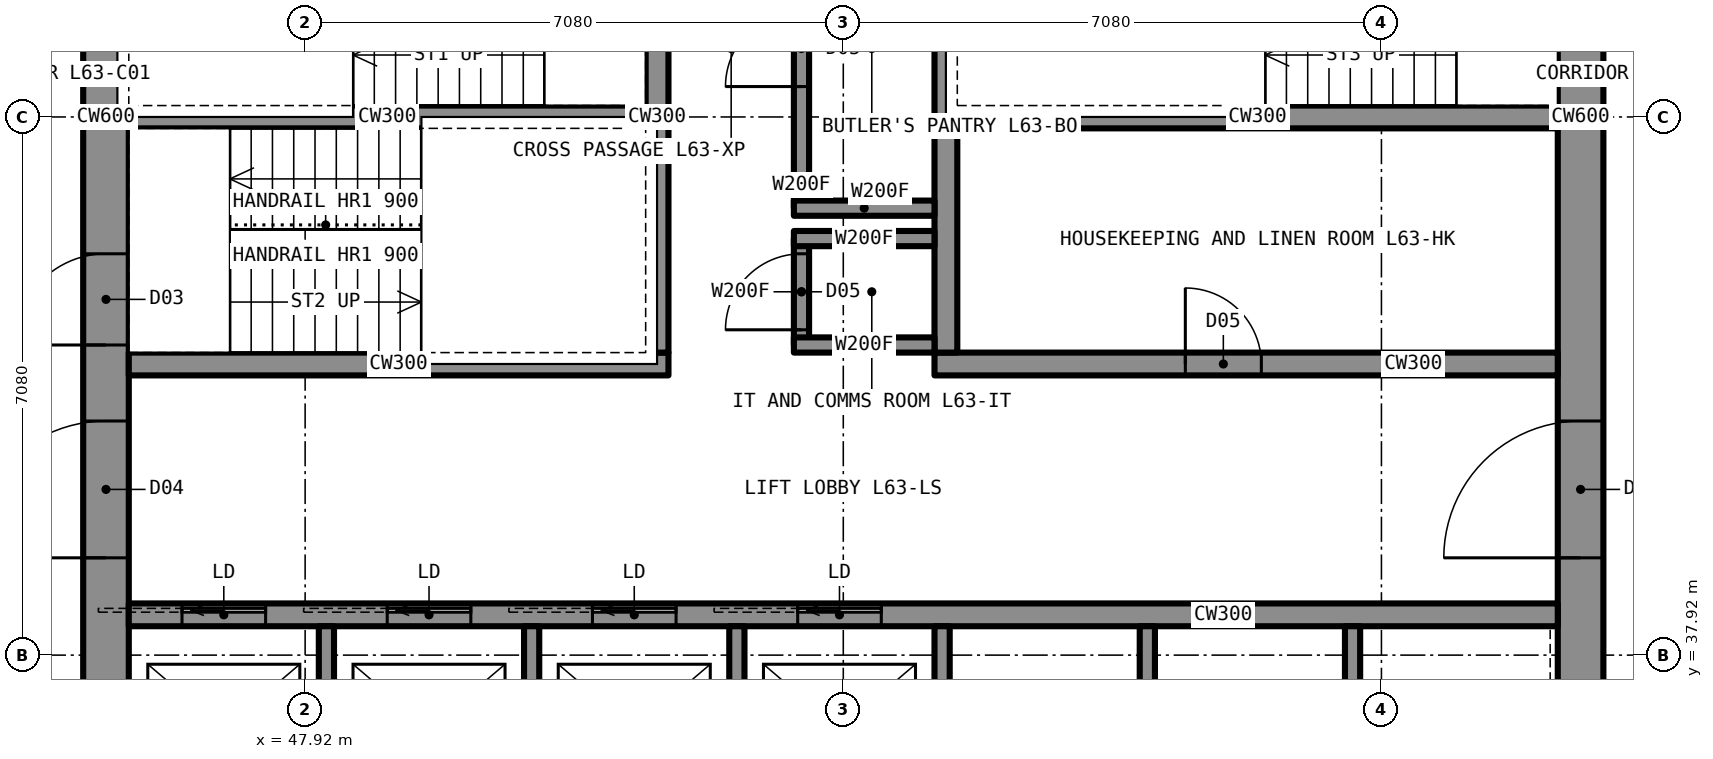
"""IFC4 building model, lengths in metres.
Left out: names, types, materials, properties, quantities, classifications, styles, units other than length and angle.
Written with IfcOpenShell. Run it as: python <this file> out.ifc"""

import sys

from ifc_helpers import new_model, si_unit, direction, frame, frame_2d, origin, place, context, subcontext, project, spatial, rectangle, extrude, element, fill, save


model = new_model("IFC4")
c1 = context("Model", 3, precision=1e-05, world=origin(), true_north=direction((0.0, 1.0)))
c2 = subcontext(c1, "Body", "Model", "MODEL_VIEW")
j1 = project(units=[si_unit("LENGTHUNIT", "METRE"), si_unit("PLANEANGLEUNIT", "RADIAN")], contexts=[c1])
p1 = place(None, origin())
s1 = spatial("IfcSite", under=j1, at=p1, CompositionType="ELEMENT")
p2 = place(p1, origin())
s2 = spatial("IfcBuilding", under=s1, at=p2, CompositionType="ELEMENT")
p3 = place(p2, frame((0.0, 0.0, 226.7)))
s3 = spatial("IfcBuildingStorey", under=s2, at=p3, CompositionType="ELEMENT", Elevation=226.7)
p4 = place(p3, frame((64.7, 35.6, 0.0), z_axis=(0.0, 0.0, 1.0), x_axis=(0.0, 1.0, 0.0)))
e1 = element("IfcWall", 1, at=p4, inside=s3, PredefinedType="SHEAR", context=c2, shape_type="SweptSolid", body=[
    extrude(rectangle(XDim=18.8, YDim=0.6, at=frame_2d((9.4, 0.0))), origin(), (0.0, 0.0, 1.0), 3.5),
])
p5 = place(p4, frame((13.4, 0.0, 0.0)))
e2 = element("IfcOpeningElement", 2, at=p5, cuts=e1, PredefinedType="OPENING", context=c2, shape_type="SweptSolid", body=[
    extrude(rectangle(XDim=1.8, YDim=2.2, at=frame_2d((0.9, 1.1))), frame((0.0, 0.31, 0.0), z_axis=(0.0, -1.0, 0.0), x_axis=(1.0, 0.0, 0.0)), (0.0, 0.0, 1.0), 0.62),
])
p6 = place(p4, frame((3.6, 0.0, 0.0)))
e3 = element("IfcOpeningElement", 3, at=p6, cuts=e1, PredefinedType="OPENING", context=c2, shape_type="SweptSolid", body=[
    extrude(rectangle(XDim=1.8, YDim=2.2, at=frame_2d((0.9, 1.1))), frame((0.0, 0.31, 0.0), z_axis=(0.0, -1.0, 0.0), x_axis=(1.0, 0.0, 0.0)), (0.0, 0.0, 1.0), 0.62),
])
p7 = place(p3, frame((45.3, 35.6, 0.0), z_axis=(0.0, 0.0, 1.0), x_axis=(0.0, 1.0, 0.0)))
e4 = element("IfcWall", 4, at=p7, inside=s3, PredefinedType="SHEAR", context=c2, shape_type="SweptSolid", body=[
    extrude(rectangle(XDim=18.8, YDim=0.6, at=frame_2d((9.4, 0.0))), origin(), (0.0, 0.0, 1.0), 3.5),
])
p8 = place(p7, frame((13.4, 0.0, 0.0)))
e5 = element("IfcOpeningElement", 5, at=p8, cuts=e4, PredefinedType="OPENING", context=c2, shape_type="SweptSolid", body=[
    extrude(rectangle(XDim=1.8, YDim=2.2, at=frame_2d((0.9, 1.1))), frame((0.0, 0.31, 0.0), z_axis=(0.0, -1.0, 0.0), x_axis=(1.0, 0.0, 0.0)), (0.0, 0.0, 1.0), 0.62),
])
p9 = place(p7, frame((3.6, 0.0, 0.0)))
e6 = element("IfcOpeningElement", 6, at=p9, cuts=e4, PredefinedType="OPENING", context=c2, shape_type="SweptSolid", body=[
    extrude(rectangle(XDim=1.8, YDim=2.2, at=frame_2d((0.9, 1.1))), frame((0.0, 0.31, 0.0), z_axis=(0.0, -1.0, 0.0), x_axis=(1.0, 0.0, 0.0)), (0.0, 0.0, 1.0), 0.62),
])
p10 = place(p7, frame((6.4, 0.0, 0.0)))
e7 = element("IfcOpeningElement", 7, at=p10, cuts=e4, PredefinedType="OPENING", context=c2, shape_type="SweptSolid", body=[
    extrude(rectangle(XDim=1.2, YDim=2.2, at=frame_2d((0.6, 1.1))), frame((0.0, 0.31, 0.0), z_axis=(0.0, -1.0, 0.0), x_axis=(1.0, 0.0, 0.0)), (0.0, 0.0, 1.0), 0.62),
])
p11 = place(p3, frame((45.6, 38.45, 0.0), z_axis=(0.0, 0.0, 1.0), x_axis=(1.0, 0.0, 0.0)))
e8 = element("IfcWall", 8, at=p11, inside=s3, PredefinedType="SHEAR", context=c2, shape_type="SweptSolid", body=[
    extrude(rectangle(XDim=18.8, YDim=0.3, at=frame_2d((9.4, 0.0))), origin(), (0.0, 0.0, 1.0), 3.5),
])
p12 = place(p11, frame((0.7, 0.0, 0.0)))
e9 = element("IfcOpeningElement", 9, at=p12, cuts=e8, PredefinedType="OPENING", context=c2, shape_type="SweptSolid", body=[
    extrude(rectangle(XDim=1.1, YDim=2.2, at=frame_2d((0.55, 1.1))), frame((0.0, 0.16, 0.0), z_axis=(0.0, -1.0, 0.0), x_axis=(1.0, 0.0, 0.0)), (0.0, 0.0, 1.0), 0.32),
])
p13 = place(p11, frame((3.4, 0.0, 0.0)))
e10 = element("IfcOpeningElement", 10, at=p13, cuts=e8, PredefinedType="OPENING", context=c2, shape_type="SweptSolid", body=[
    extrude(rectangle(XDim=1.1, YDim=2.2, at=frame_2d((0.55, 1.1))), frame((0.0, 0.16, 0.0), z_axis=(0.0, -1.0, 0.0), x_axis=(1.0, 0.0, 0.0)), (0.0, 0.0, 1.0), 0.32),
])
p14 = place(p11, frame((6.1, 0.0, 0.0)))
e11 = element("IfcOpeningElement", 11, at=p14, cuts=e8, PredefinedType="OPENING", context=c2, shape_type="SweptSolid", body=[
    extrude(rectangle(XDim=1.1, YDim=2.2, at=frame_2d((0.55, 1.1))), frame((0.0, 0.16, 0.0), z_axis=(0.0, -1.0, 0.0), x_axis=(1.0, 0.0, 0.0)), (0.0, 0.0, 1.0), 0.32),
])
p15 = place(p11, frame((8.8, 0.0, 0.0)))
e12 = element("IfcOpeningElement", 12, at=p15, cuts=e8, PredefinedType="OPENING", context=c2, shape_type="SweptSolid", body=[
    extrude(rectangle(XDim=1.1, YDim=2.2, at=frame_2d((0.55, 1.1))), frame((0.0, 0.16, 0.0), z_axis=(0.0, -1.0, 0.0), x_axis=(1.0, 0.0, 0.0)), (0.0, 0.0, 1.0), 0.32),
])
p16 = place(p3, frame((45.6, 41.75, 0.0), z_axis=(0.0, 0.0, 1.0), x_axis=(1.0, 0.0, 0.0)))
e13 = element("IfcWall", 13, at=p16, inside=s3, PredefinedType="SHEAR", context=c2, shape_type="SweptSolid", body=[
    extrude(rectangle(XDim=7.1, YDim=0.3, at=frame_2d((3.55, 0.0))), origin(), (0.0, 0.0, 1.0), 3.5),
])
p17 = place(p3, frame((56.2, 41.75, 0.0), z_axis=(0.0, 0.0, 1.0), x_axis=(1.0, 0.0, 0.0)))
e14 = element("IfcWall", 14, at=p17, inside=s3, PredefinedType="SHEAR", context=c2, shape_type="SweptSolid", body=[
    extrude(rectangle(XDim=8.2, YDim=0.3, at=frame_2d((4.1, 0.0))), origin(), (0.0, 0.0, 1.0), 3.5),
])
p18 = place(p17, frame((3.3, 0.0, 0.0)))
e15 = element("IfcOpeningElement", 15, at=p18, cuts=e14, PredefinedType="OPENING", context=c2, shape_type="SweptSolid", body=[
    extrude(rectangle(XDim=1.0, YDim=2.1, at=frame_2d((0.5, 1.05))), frame((0.0, 0.16, 0.0), z_axis=(0.0, -1.0, 0.0), x_axis=(1.0, 0.0, 0.0)), (0.0, 0.0, 1.0), 0.32),
])
p19 = place(p3, frame((52.55, 41.9, 0.0), z_axis=(0.0, 0.0, 1.0), x_axis=(0.0, 1.0, 0.0)))
e16 = element("IfcWall", 16, at=p19, inside=s3, PredefinedType="SHEAR", context=c2, shape_type="SweptSolid", body=[
    extrude(rectangle(XDim=6.2, YDim=0.3, at=frame_2d((3.1, 0.0))), origin(), (0.0, 0.0, 1.0), 3.5),
])
p20 = place(p19, frame((4.125, 0.0, 0.0)))
e17 = element("IfcOpeningElement", 17, at=p20, cuts=e16, PredefinedType="OPENING", context=c2, shape_type="SweptSolid", body=[
    extrude(rectangle(XDim=1.2, YDim=2.2, at=frame_2d((0.6, 1.1))), frame((0.0, 0.16, 0.0), z_axis=(0.0, -1.0, 0.0), x_axis=(1.0, 0.0, 0.0)), (0.0, 0.0, 1.0), 0.32),
])
p21 = place(p3, frame((56.35, 41.9, 0.0), z_axis=(0.0, 0.0, 1.0), x_axis=(0.0, 1.0, 0.0)))
e18 = element("IfcWall", 18, at=p21, inside=s3, PredefinedType="SHEAR", context=c2, shape_type="SweptSolid", body=[
    extrude(rectangle(XDim=9.5, YDim=0.3, at=frame_2d((4.75, 0.0))), origin(), (0.0, 0.0, 1.0), 3.5),
])
p22 = place(p21, frame((7.1, 0.0, 0.0)))
e19 = element("IfcOpeningElement", 19, at=p22, cuts=e18, PredefinedType="OPENING", context=c2, shape_type="SweptSolid", body=[
    extrude(rectangle(XDim=1.8, YDim=2.2, at=frame_2d((0.9, 1.1))), frame((0.0, 0.16, 0.0), z_axis=(0.0, -1.0, 0.0), x_axis=(1.0, 0.0, 0.0)), (0.0, 0.0, 1.0), 0.32),
])
p23 = place(p3, frame((45.6, 45.0, 0.0), z_axis=(0.0, 0.0, 1.0), x_axis=(1.0, 0.0, 0.0)))
e20 = element("IfcWall", 20, at=p23, inside=s3, PredefinedType="SHEAR", context=c2, shape_type="SweptSolid", body=[
    extrude(rectangle(XDim=6.8, YDim=0.3, at=frame_2d((3.4, 0.0))), origin(), (0.0, 0.0, 1.0), 3.5),
])
p24 = place(p3, frame((56.5, 45.0, 0.0), z_axis=(0.0, 0.0, 1.0), x_axis=(1.0, 0.0, 0.0)))
e21 = element("IfcWall", 21, at=p24, inside=s3, PredefinedType="SHEAR", context=c2, shape_type="SweptSolid", body=[
    extrude(rectangle(XDim=7.9, YDim=0.3, at=frame_2d((3.95, 0.0))), origin(), (0.0, 0.0, 1.0), 3.5),
])
p25 = place(p3, frame((54.45, 42.0, 0.0), z_axis=(0.0, 0.0, 1.0), x_axis=(0.0, 1.0, 0.0)))
e22 = element("IfcWall", 22, at=p25, inside=s3, PredefinedType="PARTITIONING", context=c2, shape_type="SweptSolid", body=[
    extrude(rectangle(XDim=2.3, YDim=0.2, at=frame_2d((1.15, 0.0))), origin(), (0.0, 0.0, 1.0), 3.33),
])
p26 = place(p25, frame((0.65, 0.0, 0.0)))
e23 = element("IfcOpeningElement", 23, at=p26, cuts=e22, PredefinedType="OPENING", context=c2, shape_type="SweptSolid", body=[
    extrude(rectangle(XDim=1.0, YDim=2.1, at=frame_2d((0.5, 1.05))), frame((0.0, 0.11, 0.0), z_axis=(0.0, -1.0, 0.0), x_axis=(1.0, 0.0, 0.0)), (0.0, 0.0, 1.0), 0.22),
])
for number, where, z_axis, x_axis in (
    (24, (54.35, 42.0, 0.0), (0.0, 0.0, 1.0), (1.0, 0.0, 0.0)),
    (25, (54.35, 44.3, 0.0), (0.0, 0.0, 1.0), (1.0, 0.0, 0.0)),
):
    element("IfcWall", number, at=place(p3, frame(where, z_axis=z_axis, x_axis=x_axis)), inside=s3, PredefinedType="PARTITIONING", context=c2, shape_type="SweptSolid", body=[
        extrude(rectangle(XDim=1.85, YDim=0.2, at=frame_2d((0.925, 0.0))), origin(), (0.0, 0.0, 1.0), 3.33),
    ])
p27 = place(p3, frame((54.45, 44.7, 0.0), z_axis=(0.0, 0.0, 1.0), x_axis=(0.0, 1.0, 0.0)))
e26 = element("IfcWall", 26, at=p27, inside=s3, PredefinedType="PARTITIONING", context=c2, shape_type="SweptSolid", body=[
    extrude(rectangle(XDim=3.3, YDim=0.2, at=frame_2d((1.65, 0.0))), origin(), (0.0, 0.0, 1.0), 3.33),
])
p28 = place(p27, frame((1.15, 0.0, 0.0)))
e27 = element("IfcOpeningElement", 27, at=p28, cuts=e26, PredefinedType="OPENING", context=c2, shape_type="SweptSolid", body=[
    extrude(rectangle(XDim=1.0, YDim=2.1, at=frame_2d((0.5, 1.05))), frame((0.0, 0.11, 0.0), z_axis=(0.0, -1.0, 0.0), x_axis=(1.0, 0.0, 0.0)), (0.0, 0.0, 1.0), 0.22),
])
p29 = place(p3, frame((54.35, 44.7, 0.0), z_axis=(0.0, 0.0, 1.0), x_axis=(1.0, 0.0, 0.0)))
e28 = element("IfcWall", 28, at=p29, inside=s3, PredefinedType="PARTITIONING", context=c2, shape_type="SweptSolid", body=[
    extrude(rectangle(XDim=1.85, YDim=0.2, at=frame_2d((0.925, 0.0))), origin(), (0.0, 0.0, 1.0), 3.33),
])
for number, where, z_axis, x_axis in (
    (29, (48.2, 35.6, 0.0), (0.0, 0.0, 1.0), (0.0, 1.0, 0.0)),
    (30, (50.9, 35.6, 0.0), (0.0, 0.0, 1.0), (0.0, 1.0, 0.0)),
    (31, (53.6, 35.6, 0.0), (0.0, 0.0, 1.0), (0.0, 1.0, 0.0)),
    (32, (56.3, 35.6, 0.0), (0.0, 0.0, 1.0), (0.0, 1.0, 0.0)),
    (33, (59.0, 35.6, 0.0), (0.0, 0.0, 1.0), (0.0, 1.0, 0.0)),
    (34, (61.7, 35.6, 0.0), (0.0, 0.0, 1.0), (0.0, 1.0, 0.0)),
):
    element("IfcWall", number, at=place(p3, frame(where, z_axis=z_axis, x_axis=x_axis)), inside=s3, PredefinedType="PARTITIONING", context=c2, shape_type="SweptSolid", body=[
        extrude(rectangle(XDim=2.7, YDim=0.2, at=frame_2d((1.35, 0.0))), origin(), (0.0, 0.0, 1.0), 3.33),
    ])
p30 = place(p26, origin())
e35 = element("IfcDoor", 35, at=p30, inside=s3, OperationType="SINGLE_SWING_LEFT", PredefinedType="DOOR", context=c2, shape_type="SweptSolid", body=[
    extrude(rectangle(XDim=1.0, YDim=2.1, at=frame_2d((0.5, 1.05))), frame((0.0, 0.025, 0.0), z_axis=(0.0, -1.0, 0.0), x_axis=(1.0, 0.0, 0.0)), (0.0, 0.0, 1.0), 0.05),
])
fill(e23, e35)
p31 = place(p28, origin())
e36 = element("IfcDoor", 36, at=p31, inside=s3, OperationType="SINGLE_SWING_LEFT", PredefinedType="DOOR", context=c2, shape_type="SweptSolid", body=[
    extrude(rectangle(XDim=1.0, YDim=2.1, at=frame_2d((0.5, 1.05))), frame((0.0, 0.025, 0.0), z_axis=(0.0, -1.0, 0.0), x_axis=(1.0, 0.0, 0.0)), (0.0, 0.0, 1.0), 0.05),
])
fill(e27, e36)
p32 = place(p9, origin())
e37 = element("IfcDoor", 37, at=p32, inside=s3, OperationType="DOUBLE_DOOR_SINGLE_SWING", PredefinedType="DOOR", context=c2, shape_type="SweptSolid", body=[
    extrude(rectangle(XDim=1.8, YDim=2.2, at=frame_2d((0.9, 1.1))), frame((0.0, 0.025, 0.0), z_axis=(0.0, -1.0, 0.0), x_axis=(1.0, 0.0, 0.0)), (0.0, 0.0, 1.0), 0.05),
])
fill(e6, e37)
p33 = place(p6, origin())
e38 = element("IfcDoor", 38, at=p33, inside=s3, OperationType="DOUBLE_DOOR_SINGLE_SWING", PredefinedType="DOOR", context=c2, shape_type="SweptSolid", body=[
    extrude(rectangle(XDim=1.8, YDim=2.2, at=frame_2d((0.9, 1.1))), frame((0.0, 0.025, 0.0), z_axis=(0.0, -1.0, 0.0), x_axis=(1.0, 0.0, 0.0)), (0.0, 0.0, 1.0), 0.05),
])
fill(e3, e38)
p34 = place(p10, origin())
e39 = element("IfcDoor", 39, at=p34, inside=s3, OperationType="SINGLE_SWING_LEFT", PredefinedType="DOOR", context=c2, shape_type="SweptSolid", body=[
    extrude(rectangle(XDim=1.2, YDim=2.2, at=frame_2d((0.6, 1.1))), frame((0.0, 0.025, 0.0), z_axis=(0.0, -1.0, 0.0), x_axis=(1.0, 0.0, 0.0)), (0.0, 0.0, 1.0), 0.05),
])
fill(e7, e39)
p35 = place(p18, origin())
e40 = element("IfcDoor", 40, at=p35, inside=s3, OperationType="SINGLE_SWING_LEFT", PredefinedType="DOOR", context=c2, shape_type="SweptSolid", body=[
    extrude(rectangle(XDim=1.0, YDim=2.1, at=frame_2d((0.5, 1.05))), frame((0.0, 0.025, 0.0), z_axis=(0.0, -1.0, 0.0), x_axis=(1.0, 0.0, 0.0)), (0.0, 0.0, 1.0), 0.05),
])
fill(e15, e40)
p36 = place(p12, origin())
e41 = element("IfcDoor", 41, at=p36, inside=s3, OperationType="SLIDING_TO_LEFT", PredefinedType="DOOR", context=c2, shape_type="SweptSolid", body=[
    extrude(rectangle(XDim=1.1, YDim=2.2, at=frame_2d((0.55, 1.1))), frame((0.0, 0.025, 0.0), z_axis=(0.0, -1.0, 0.0), x_axis=(1.0, 0.0, 0.0)), (0.0, 0.0, 1.0), 0.05),
])
fill(e9, e41)
p37 = place(p13, origin())
e42 = element("IfcDoor", 42, at=p37, inside=s3, OperationType="SLIDING_TO_LEFT", PredefinedType="DOOR", context=c2, shape_type="SweptSolid", body=[
    extrude(rectangle(XDim=1.1, YDim=2.2, at=frame_2d((0.55, 1.1))), frame((0.0, 0.025, 0.0), z_axis=(0.0, -1.0, 0.0), x_axis=(1.0, 0.0, 0.0)), (0.0, 0.0, 1.0), 0.05),
])
fill(e10, e42)
p38 = place(p14, origin())
e43 = element("IfcDoor", 43, at=p38, inside=s3, OperationType="SLIDING_TO_LEFT", PredefinedType="DOOR", context=c2, shape_type="SweptSolid", body=[
    extrude(rectangle(XDim=1.1, YDim=2.2, at=frame_2d((0.55, 1.1))), frame((0.0, 0.025, 0.0), z_axis=(0.0, -1.0, 0.0), x_axis=(1.0, 0.0, 0.0)), (0.0, 0.0, 1.0), 0.05),
])
fill(e11, e43)
p39 = place(p15, origin())
e44 = element("IfcDoor", 44, at=p39, inside=s3, OperationType="SLIDING_TO_LEFT", PredefinedType="DOOR", context=c2, shape_type="SweptSolid", body=[
    extrude(rectangle(XDim=1.1, YDim=2.2, at=frame_2d((0.55, 1.1))), frame((0.0, 0.025, 0.0), z_axis=(0.0, -1.0, 0.0), x_axis=(1.0, 0.0, 0.0)), (0.0, 0.0, 1.0), 0.05),
])
fill(e12, e44)
save(model, sys.argv[1])
